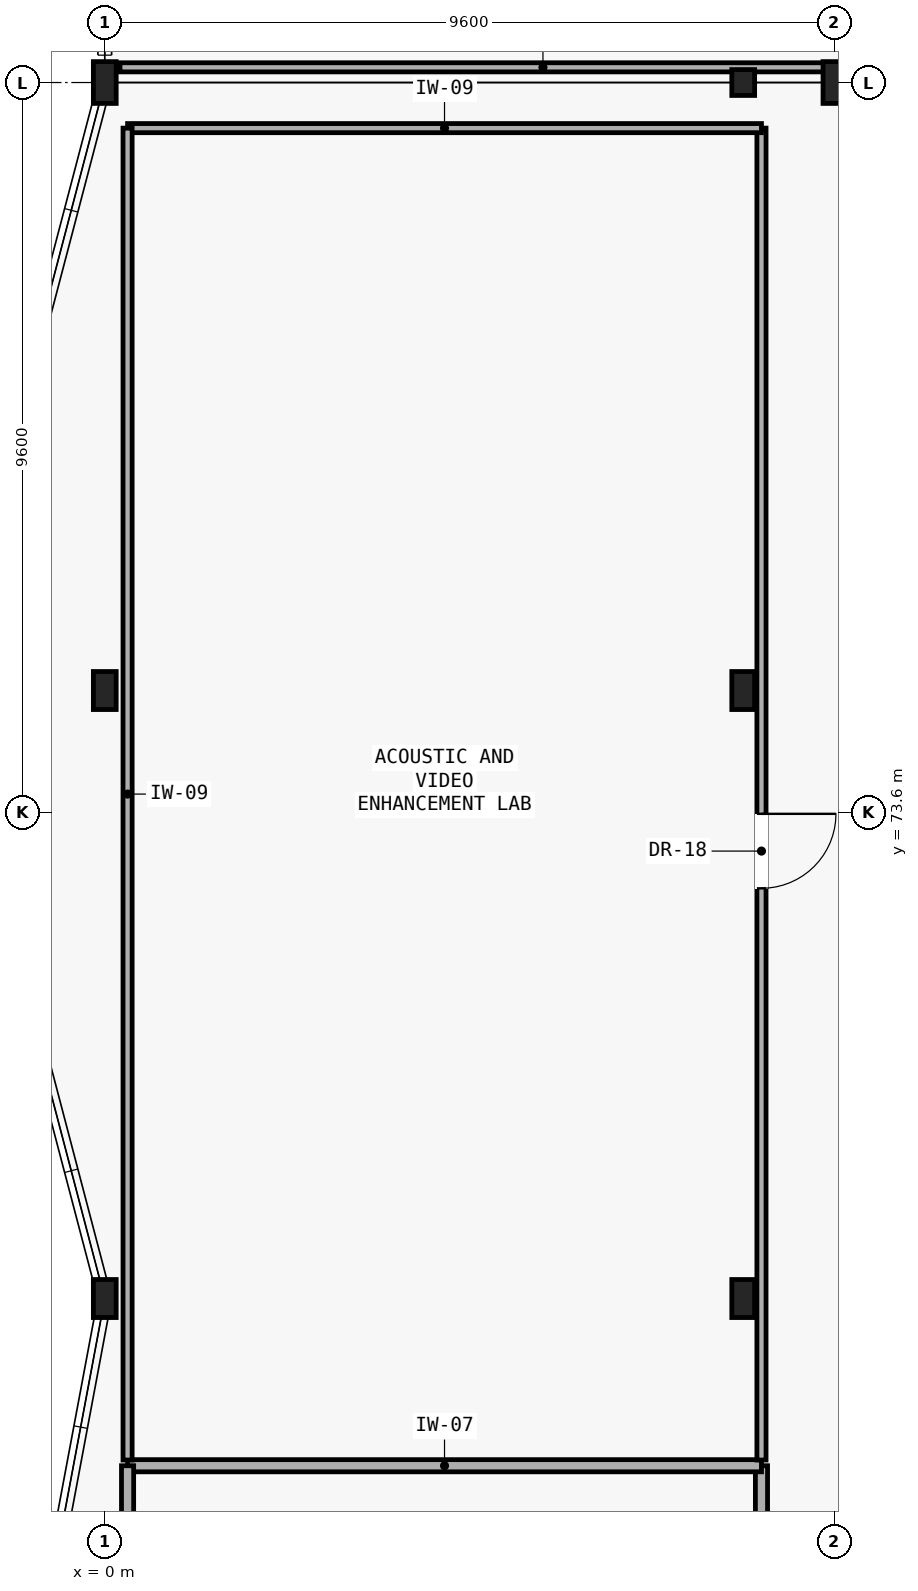
"""IFC4 building model, lengths in metres.
Left out: names, types, materials, properties, quantities, classifications, styles, units other than length and angle.
Written with IfcOpenShell. Run it as: python <this file> out.ifc"""

import sys

from ifc_helpers import new_model, si_unit, direction, frame, frame_2d, origin, origin_2d, place, context, subcontext, project, spatial, rectangle, i_section, extrude, element, fill, save


model = new_model("IFC4")
c1 = context("Model", 3, precision=1e-05, world=origin(), true_north=direction((0.0, 1.0)))
c2 = subcontext(c1, "Body", "Model", "MODEL_VIEW")
j1 = project(units=[si_unit("LENGTHUNIT", "METRE"), si_unit("PLANEANGLEUNIT", "RADIAN")], contexts=[c1])
p1 = place(None, origin())
s1 = spatial("IfcSite", under=j1, at=p1, CompositionType="ELEMENT")
p2 = place(p1, origin())
s2 = spatial("IfcBuilding", under=s1, at=p2, CompositionType="ELEMENT")
p3 = place(p2, frame((0.0, 0.0, 13.65)))
s3 = spatial("IfcBuildingStorey", under=s2, at=p3, CompositionType="ELEMENT", Elevation=13.65)
for number, where, z_axis, x_axis in (
    (1, (0.0, 83.2, 0.0), (0.0, 0.0, 1.0), (1.0, 0.0, 0.0)),
    (2, (9.6, 83.2, 0.0), (0.0, 0.0, 1.0), (1.0, 0.0, 0.0)),
):
    element("IfcColumn", number, at=place(p3, frame(where, z_axis=z_axis, x_axis=x_axis)), inside=s3, PredefinedType="COLUMN", context=c2, shape_type="SweptSolid", body=[
        extrude(i_section(OverallWidth=0.3, OverallDepth=0.55, WebThickness=0.015, FlangeThickness=0.029, FilletRadius=0.027, at=origin_2d()), origin(), (0.0, 0.0, 1.0), 4.2),
    ])
for number, where, z_axis, x_axis in (
    (3, (0.0, 67.2, 0.0), (0.0, 0.0, 1.0), (1.0, 0.0, 0.0)),
    (4, (8.4, 67.2, 0.0), (0.0, 0.0, 1.0), (1.0, 0.0, 0.0)),
    (5, (0.0, 75.2, 0.0), (0.0, 0.0, 1.0), (1.0, 0.0, 0.0)),
    (6, (8.4, 75.2, 0.0), (0.0, 0.0, 1.0), (1.0, 0.0, 0.0)),
):
    element("IfcColumn", number, at=place(p3, frame(where, z_axis=z_axis, x_axis=x_axis)), inside=s3, PredefinedType="COLUMN", context=c2, shape_type="SweptSolid", body=[
        extrude(i_section(OverallWidth=0.3, OverallDepth=0.5, WebThickness=0.014, FlangeThickness=0.028, FilletRadius=0.027, at=origin_2d()), origin(), (0.0, 0.0, 1.0), 4.2),
    ])
p4 = place(p3, frame((8.4, 83.2, 0.0), z_axis=(0.0, 0.0, 1.0), x_axis=(1.0, 0.0, 0.0)))
e7 = element("IfcColumn", 7, at=p4, inside=s3, PredefinedType="COLUMN", context=c2, shape_type="SweptSolid", body=[
    extrude(i_section(OverallWidth=0.3, OverallDepth=0.34, WebThickness=0.012, FlangeThickness=0.021, FilletRadius=0.027, at=origin_2d()), origin(), (0.0, 0.0, 1.0), 4.2),
])
p5 = place(p3, frame((0.2, 83.4, 0.0), z_axis=(0.0, 0.0, 1.0), x_axis=(1.0, 0.0, 0.0)))
e8 = element("IfcWall", 8, at=p5, inside=s3, PredefinedType="PARTITIONING", context=c2, shape_type="SweptSolid", body=[
    extrude(rectangle(XDim=15.9, YDim=0.12, at=frame_2d((7.95, 0.0))), origin(), (0.0, 0.0, 1.0), 3.145),
])
p6 = place(p3, frame((8.64, 48.25, 0.0), z_axis=(0.0, 0.0, 1.0), x_axis=(0.0, 1.0, 0.0)))
e9 = element("IfcWall", 9, at=p6, inside=s3, PredefinedType="PARTITIONING", context=c2, shape_type="SweptSolid", body=[
    extrude(rectangle(XDim=16.75, YDim=0.16, at=frame_2d((8.375, 0.0))), origin(), (0.0, 0.0, 1.0), 3.52),
])
p7 = place(p6, frame((6.4, 0.0, 0.0)))
e10 = element("IfcOpeningElement", 10, at=p7, cuts=e9, PredefinedType="OPENING", context=c2, shape_type="SweptSolid", body=[
    extrude(rectangle(XDim=1.45, YDim=2.15, at=frame_2d((0.725, 1.075))), frame((0.0, 0.09, 0.0), z_axis=(0.0, -1.0, 0.0), x_axis=(1.0, 0.0, 0.0)), (0.0, 0.0, 1.0), 0.18),
])
p8 = place(p3, frame((8.64, 65.0, 0.0), z_axis=(0.0, 0.0, 1.0), x_axis=(-1.0, 0.0, 0.0)))
e11 = element("IfcWall", 11, at=p8, inside=s3, PredefinedType="PARTITIONING", context=c2, shape_type="SweptSolid", body=[
    extrude(rectangle(XDim=8.34, YDim=0.16, at=frame_2d((4.17, 0.0))), origin(), (0.0, 0.0, 1.0), 3.98),
])
p9 = place(p3, frame((0.3, 65.0, 0.0), z_axis=(0.0, 0.0, 1.0), x_axis=(0.0, -1.0, 0.0)))
e12 = element("IfcWall", 12, at=p9, inside=s3, PredefinedType="PARTITIONING", context=c2, shape_type="SweptSolid", body=[
    extrude(rectangle(XDim=16.75, YDim=0.16, at=frame_2d((8.375, 0.0))), origin(), (0.0, 0.0, 1.0), 3.52),
])
p10 = place(p3, frame((8.64, 65.075, 0.0), z_axis=(0.0, 0.0, 1.0), x_axis=(0.0, 1.0, 0.0)))
e13 = element("IfcWall", 13, at=p10, inside=s3, PredefinedType="PARTITIONING", context=c2, shape_type="SweptSolid", body=[
    extrude(rectangle(XDim=17.525, YDim=0.12, at=frame_2d((8.763, 0.0))), origin(), (0.0, 0.0, 1.0), 3.52),
])
p11 = place(p10, frame((7.522, 0.0, 0.0)))
e14 = element("IfcOpeningElement", 14, at=p11, cuts=e13, PredefinedType="OPENING", context=c2, shape_type="SweptSolid", body=[
    extrude(rectangle(XDim=0.98, YDim=2.1, at=frame_2d((0.49, 1.05))), frame((0.0, 0.07, 0.0), z_axis=(0.0, -1.0, 0.0), x_axis=(1.0, 0.0, 0.0)), (0.0, 0.0, 1.0), 0.14),
])
p12 = place(p3, frame((8.64, 82.6, 0.0), z_axis=(0.0, 0.0, 1.0), x_axis=(-1.0, 0.0, 0.0)))
e15 = element("IfcWall", 15, at=p12, inside=s3, PredefinedType="PARTITIONING", context=c2, shape_type="SweptSolid", body=[
    extrude(rectangle(XDim=8.34, YDim=0.12, at=frame_2d((4.17, 0.0))), origin(), (0.0, 0.0, 1.0), 3.98),
])
p13 = place(p3, frame((0.3, 82.6, 0.0), z_axis=(0.0, 0.0, 1.0), x_axis=(0.0, -1.0, 0.0)))
e16 = element("IfcWall", 16, at=p13, inside=s3, PredefinedType="PARTITIONING", context=c2, shape_type="SweptSolid", body=[
    extrude(rectangle(XDim=17.525, YDim=0.12, at=frame_2d((8.763, 0.0))), origin(), (0.0, 0.0, 1.0), 3.98),
])
p14 = place(p11, frame((0.98, 0.0, 0.0), z_axis=(0.0, 0.0, 1.0), x_axis=(-1.0, 0.0, 0.0)))
e17 = element("IfcDoor", 17, at=p14, inside=s3, OperationType="SINGLE_SWING_RIGHT", PredefinedType="DOOR", context=c2, shape_type="SweptSolid", body=[
    extrude(rectangle(XDim=0.98, YDim=2.1, at=frame_2d((0.49, 1.05))), frame((0.0, 0.025, 0.0), z_axis=(0.0, -1.0, 0.0), x_axis=(1.0, 0.0, 0.0)), (0.0, 0.0, 1.0), 0.05),
])
fill(e14, e17)
save(model, sys.argv[1])
